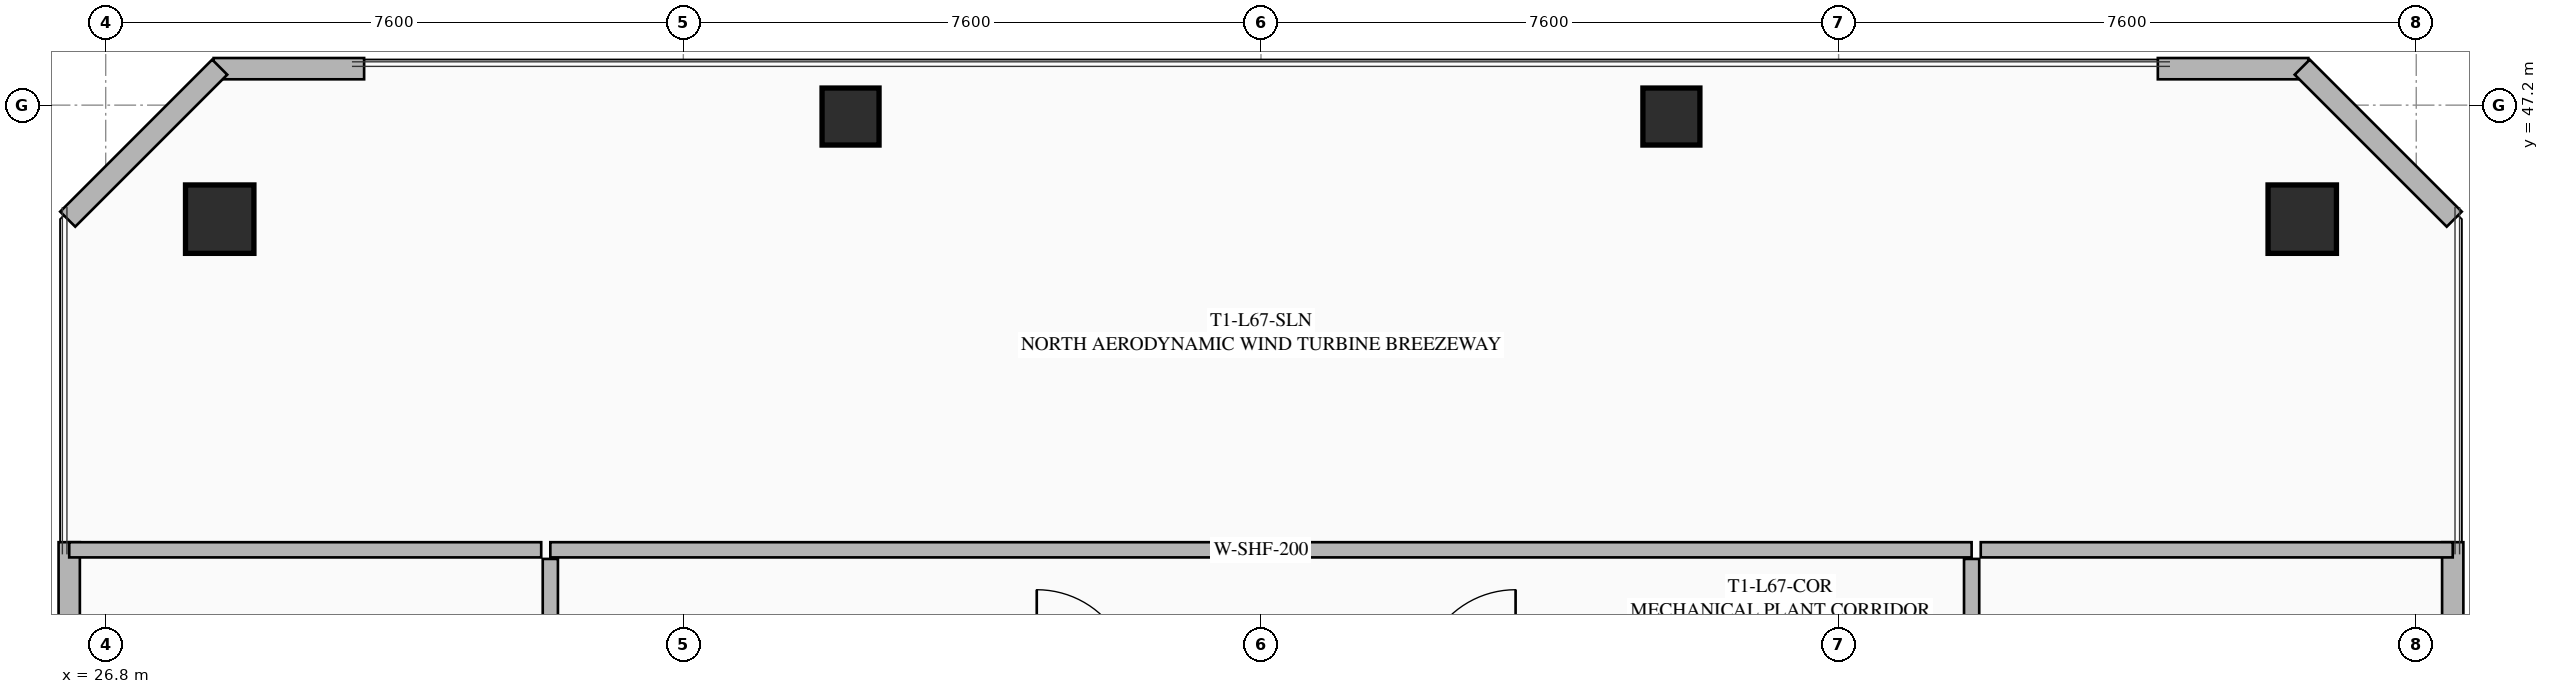
"""IFC4 building model, lengths in metres.
Left out: names, types, materials, properties, quantities, classifications, styles, units other than length and angle.
Written with IfcOpenShell. Run it as: python <this file> out.ifc"""

import sys

from ifc_helpers import new_model, si_unit, direction, frame, frame_2d, origin, origin_2d, place, context, subcontext, project, spatial, rectangle, hollow_rectangle, extrude, element, save


model = new_model("IFC4")
c1 = context("Model", 3, precision=1e-05, world=origin(), true_north=direction((0.0, 1.0)))
c2 = subcontext(c1, "Body", "Model", "MODEL_VIEW")
j1 = project(units=[si_unit("LENGTHUNIT", "METRE"), si_unit("PLANEANGLEUNIT", "RADIAN")], contexts=[c1])
p1 = place(None, origin())
s1 = spatial("IfcSite", under=j1, at=p1, CompositionType="ELEMENT")
p2 = place(p1, origin())
s2 = spatial("IfcBuilding", under=s1, at=p2, CompositionType="ELEMENT")
p3 = place(p2, frame((0.0, 0.0, 246.8)))
s3 = spatial("IfcBuildingStorey", under=s2, at=p3, CompositionType="ELEMENT", Elevation=246.8)
for number, where, z_axis, x_axis in (
    (1, (55.7, 45.7, 0.0), (0.0, 0.0, 1.0), (1.0, 0.0, 0.0)),
    (2, (28.3, 45.7, 0.0), (0.0, 0.0, 1.0), (1.0, 0.0, 0.0)),
):
    element("IfcColumn", number, at=place(p3, frame(where, z_axis=z_axis, x_axis=x_axis)), inside=s3, PredefinedType="COLUMN", context=c2, shape_type="SweptSolid", body=[
        extrude(hollow_rectangle(XDim=0.9, YDim=0.9, WallThickness=0.04, at=origin_2d()), origin(), (0.0, 0.0, 1.0), 4.38),
    ])
for number, where, z_axis, x_axis in (
    (3, (47.4, 47.05, 0.0), (0.0, 0.0, 1.0), (1.0, 0.0, 0.0)),
    (4, (36.6, 47.05, 0.0), (0.0, 0.0, 1.0), (1.0, 0.0, 0.0)),
):
    element("IfcColumn", number, at=place(p3, frame(where, z_axis=z_axis, x_axis=x_axis)), inside=s3, PredefinedType="COLUMN", context=c2, shape_type="SweptSolid", body=[
        extrude(hollow_rectangle(XDim=0.75, YDim=0.75, WallThickness=0.032, at=origin_2d()), origin(), (0.0, 0.0, 1.0), 4.38),
    ])
p4 = place(p3, frame((26.32, 22.55, 0.0), z_axis=(0.0, 0.0, 1.0), x_axis=(0.0, 1.0, 0.0)))
e5 = element("IfcWall", 5, at=p4, inside=s3, PredefinedType="SOLIDWALL", context=c2, shape_type="SweptSolid", body=[
    extrude(rectangle(XDim=18.9, YDim=0.28, at=frame_2d((9.45, 0.0))), origin(), (0.0, 0.0, 1.0), 4.38),
])
for number, where, z_axis, x_axis in (
    (6, (28.22, 47.68, 0.0), (0.0, 0.0, 1.0), (1.0, 0.0, 0.0)),
    (7, (53.8, 47.68, 0.0), (0.0, 0.0, 1.0), (1.0, 0.0, 0.0)),
):
    element("IfcWall", number, at=place(p3, frame(where, z_axis=z_axis, x_axis=x_axis)), inside=s3, PredefinedType="SOLIDWALL", context=c2, shape_type="SweptSolid", body=[
        extrude(rectangle(XDim=1.98, YDim=0.28, at=frame_2d((0.99, 0.0))), origin(), (0.0, 0.0, 1.0), 4.38),
    ])
p5 = place(p3, frame((57.68, 41.45, 0.0), z_axis=(0.0, 0.0, 1.0), x_axis=(0.0, -1.0, 0.0)))
e8 = element("IfcWall", 8, at=p5, inside=s3, PredefinedType="SOLIDWALL", context=c2, shape_type="SweptSolid", body=[
    extrude(rectangle(XDim=18.9, YDim=0.28, at=frame_2d((9.45, 0.0))), origin(), (0.0, 0.0, 1.0), 4.38),
])
for number, where, z_axis, x_axis in (
    (9, (26.3, 45.7, 0.0), (0.0, 0.0, 1.0), (0.707, 0.707, 0.0)),
    (10, (55.7, 47.7, 0.0), (0.0, 0.0, 1.0), (0.707, -0.707, 0.0)),
):
    element("IfcWall", number, at=place(p3, frame(where, z_axis=z_axis, x_axis=x_axis)), inside=s3, PredefinedType="SOLIDWALL", context=c2, shape_type="SweptSolid", body=[
        extrude(rectangle(XDim=2.828, YDim=0.28, at=frame_2d((1.414, 0.0))), origin(), (0.0, 0.0, 1.0), 4.38),
    ])
p6 = place(p3, frame((32.65, 41.35, 0.0), z_axis=(0.0, 0.0, 1.0), x_axis=(1.0, 0.0, 0.0)))
e11 = element("IfcWall", 11, at=p6, inside=s3, PredefinedType="SOLIDWALL", context=c2, shape_type="SweptSolid", body=[
    extrude(rectangle(XDim=18.7, YDim=0.2, at=frame_2d((9.35, 0.0))), origin(), (0.0, 0.0, 1.0), 3.491),
])
p7 = place(p3, frame((51.35, 41.23, 0.0), z_axis=(0.0, 0.0, 1.0), x_axis=(0.0, -1.0, 0.0)))
e12 = element("IfcWall", 12, at=p7, inside=s3, PredefinedType="SOLIDWALL", context=c2, shape_type="SweptSolid", body=[
    extrude(rectangle(XDim=18.46, YDim=0.2, at=frame_2d((9.23, 0.0))), origin(), (0.0, 0.0, 1.0), 3.491),
])
p8 = place(p7, frame((2.2, 0.0, 0.0)))
e13 = element("IfcOpeningElement", 13, at=p8, cuts=e12, PredefinedType="OPENING", context=c2, shape_type="SweptSolid", body=[
    extrude(rectangle(XDim=1.25, YDim=2.25, at=frame_2d((0.625, 1.125))), frame((0.0, 0.11, 0.0), z_axis=(0.0, -1.0, 0.0), x_axis=(1.0, 0.0, 0.0)), (0.0, 0.0, 1.0), 0.22),
])
p9 = place(p7, frame((8.6, 0.0, 0.0)))
e14 = element("IfcOpeningElement", 14, at=p9, cuts=e12, PredefinedType="OPENING", context=c2, shape_type="SweptSolid", body=[
    extrude(rectangle(XDim=1.15, YDim=2.2, at=frame_2d((0.575, 1.1))), frame((0.0, 0.11, 0.0), z_axis=(0.0, -1.0, 0.0), x_axis=(1.0, 0.0, 0.0)), (0.0, 0.0, 1.0), 0.22),
])
p10 = place(p7, frame((16.0, 0.0, 0.0)))
e15 = element("IfcOpeningElement", 15, at=p10, cuts=e12, PredefinedType="OPENING", context=c2, shape_type="SweptSolid", body=[
    extrude(rectangle(XDim=1.15, YDim=2.2, at=frame_2d((0.575, 1.1))), frame((0.0, 0.11, 0.0), z_axis=(0.0, -1.0, 0.0), x_axis=(1.0, 0.0, 0.0)), (0.0, 0.0, 1.0), 0.22),
])
p11 = place(p3, frame((32.65, 35.4, 0.0), z_axis=(0.0, 0.0, 1.0), x_axis=(0.0, 1.0, 0.0)))
e16 = element("IfcWall", 16, at=p11, inside=s3, PredefinedType="SOLIDWALL", context=c2, shape_type="SweptSolid", body=[
    extrude(rectangle(XDim=5.83, YDim=0.2, at=frame_2d((2.915, 0.0))), origin(), (0.0, 0.0, 1.0), 3.491),
])
p12 = place(p11, frame((3.37, 0.0, 0.0)))
e17 = element("IfcOpeningElement", 17, at=p12, cuts=e16, PredefinedType="OPENING", context=c2, shape_type="SweptSolid", body=[
    extrude(rectangle(XDim=1.15, YDim=2.2, at=frame_2d((0.575, 1.1))), frame((0.0, 0.11, 0.0), z_axis=(0.0, -1.0, 0.0), x_axis=(1.0, 0.0, 0.0)), (0.0, 0.0, 1.0), 0.22),
])
for number, where, z_axis, x_axis in (
    (18, (51.47, 41.35, 0.0), (0.0, 0.0, 1.0), (1.0, 0.0, 0.0)),
    (19, (26.32, 41.35, 0.0), (0.0, 0.0, 1.0), (1.0, 0.0, 0.0)),
):
    element("IfcWall", number, at=place(p3, frame(where, z_axis=z_axis, x_axis=x_axis)), inside=s3, PredefinedType="SOLIDWALL", context=c2, shape_type="SweptSolid", body=[
        extrude(rectangle(XDim=6.21, YDim=0.2, at=frame_2d((3.105, 0.0))), origin(), (0.0, 0.0, 1.0), 3.491),
    ])
save(model, sys.argv[1])
